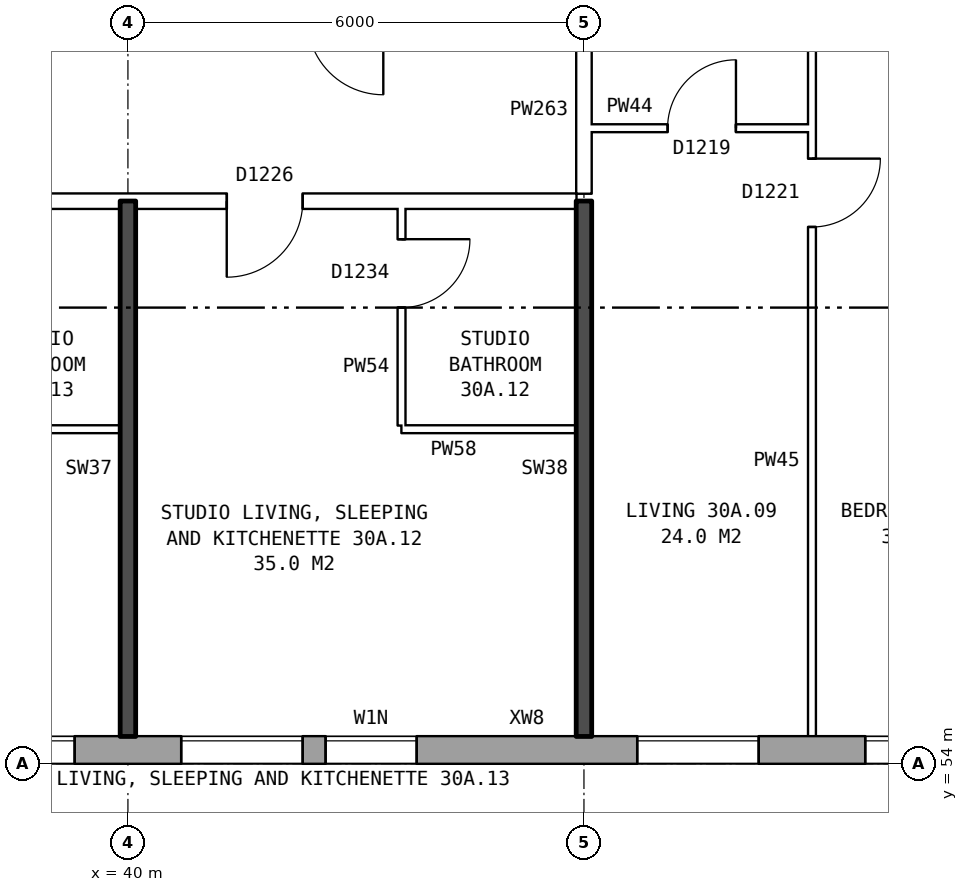
"""IFC4 building model, lengths in metres.
Left out: names, types, materials, properties, quantities, classifications, styles, units other than length and angle.
Written with IfcOpenShell. Run it as: python <this file> out.ifc"""

import sys

from ifc_helpers import new_model, si_unit, direction, frame, frame_2d, origin, place, context, subcontext, project, spatial, rectangle, extrude, element, fill, save


model = new_model("IFC4")
c1 = context("Model", 3, precision=1e-05, world=origin(), true_north=direction((0.0, 1.0)))
c2 = subcontext(c1, "Body", "Model", "MODEL_VIEW")
j1 = project(units=[si_unit("LENGTHUNIT", "METRE"), si_unit("PLANEANGLEUNIT", "RADIAN")], contexts=[c1])
p1 = place(None, origin())
s1 = spatial("IfcSite", under=j1, at=p1, CompositionType="ELEMENT")
p2 = place(p1, origin())
s2 = spatial("IfcBuilding", under=s1, at=p2, CompositionType="ELEMENT")
p3 = place(p2, frame((0.0, 0.0, 108.8)))
s3 = spatial("IfcBuildingStorey", under=s2, at=p3, CompositionType="ELEMENT", Elevation=108.8)
p4 = place(p3, frame((28.075, 54.18, 0.0), z_axis=(0.0, 0.0, 1.0), x_axis=(1.0, 0.0, 0.0)))
e1 = element("IfcWall", 1, at=p4, inside=s3, PredefinedType="STANDARD", context=c2, shape_type="SweptSolid", body=[
    extrude(rectangle(XDim=44.851, YDim=0.36, at=frame_2d((22.425, 0.0))), origin(), (0.0, 0.0, 1.0), 2.85),
])
p5 = place(p4, frame((0.625, 0.0, 0.8)))
e2 = element("IfcOpeningElement", 2, at=p5, cuts=e1, PredefinedType="OPENING", context=c2, shape_type="SweptSolid", body=[
    extrude(rectangle(XDim=1.6, YDim=1.8, at=frame_2d((0.8, 0.9))), frame((0.0, 0.19, 0.0), z_axis=(0.0, -1.0, 0.0), x_axis=(1.0, 0.0, 0.0)), (0.0, 0.0, 1.0), 0.38),
])
p6 = place(p4, frame((3.625, 0.0, 0.8)))
e3 = element("IfcOpeningElement", 3, at=p6, cuts=e1, PredefinedType="OPENING", context=c2, shape_type="SweptSolid", body=[
    extrude(rectangle(XDim=1.6, YDim=1.8, at=frame_2d((0.8, 0.9))), frame((0.0, 0.19, 0.0), z_axis=(0.0, -1.0, 0.0), x_axis=(1.0, 0.0, 0.0)), (0.0, 0.0, 1.0), 0.38),
])
p7 = place(p4, frame((6.625, 0.0, 0.8)))
e4 = element("IfcOpeningElement", 4, at=p7, cuts=e1, PredefinedType="OPENING", context=c2, shape_type="SweptSolid", body=[
    extrude(rectangle(XDim=1.6, YDim=1.8, at=frame_2d((0.8, 0.9))), frame((0.0, 0.19, 0.0), z_axis=(0.0, -1.0, 0.0), x_axis=(1.0, 0.0, 0.0)), (0.0, 0.0, 1.0), 0.38),
])
p8 = place(p4, frame((9.625, 0.0, 0.8)))
e5 = element("IfcOpeningElement", 5, at=p8, cuts=e1, PredefinedType="OPENING", context=c2, shape_type="SweptSolid", body=[
    extrude(rectangle(XDim=1.6, YDim=1.8, at=frame_2d((0.8, 0.9))), frame((0.0, 0.19, 0.0), z_axis=(0.0, -1.0, 0.0), x_axis=(1.0, 0.0, 0.0)), (0.0, 0.0, 1.0), 0.38),
])
p9 = place(p4, frame((12.625, 0.0, 0.8)))
e6 = element("IfcOpeningElement", 6, at=p9, cuts=e1, PredefinedType="OPENING", context=c2, shape_type="SweptSolid", body=[
    extrude(rectangle(XDim=1.6, YDim=1.8, at=frame_2d((0.8, 0.9))), frame((0.0, 0.19, 0.0), z_axis=(0.0, -1.0, 0.0), x_axis=(1.0, 0.0, 0.0)), (0.0, 0.0, 1.0), 0.38),
])
p10 = place(p4, frame((14.525, 0.0, 1.4)))
e7 = element("IfcOpeningElement", 7, at=p10, cuts=e1, PredefinedType="OPENING", context=c2, shape_type="SweptSolid", body=[
    extrude(rectangle(XDim=1.2, YDim=1.2, at=frame_2d((0.6, 0.6))), frame((0.0, 0.19, 0.0), z_axis=(0.0, -1.0, 0.0), x_axis=(1.0, 0.0, 0.0)), (0.0, 0.0, 1.0), 0.38),
])
p11 = place(p4, frame((18.625, 0.0, 0.8)))
e8 = element("IfcOpeningElement", 8, at=p11, cuts=e1, PredefinedType="OPENING", context=c2, shape_type="SweptSolid", body=[
    extrude(rectangle(XDim=1.6, YDim=1.8, at=frame_2d((0.8, 0.9))), frame((0.0, 0.19, 0.0), z_axis=(0.0, -1.0, 0.0), x_axis=(1.0, 0.0, 0.0)), (0.0, 0.0, 1.0), 0.38),
])
p12 = place(p4, frame((21.625, 0.0, 0.8)))
e9 = element("IfcOpeningElement", 9, at=p12, cuts=e1, PredefinedType="OPENING", context=c2, shape_type="SweptSolid", body=[
    extrude(rectangle(XDim=1.6, YDim=1.8, at=frame_2d((0.8, 0.9))), frame((0.0, 0.19, 0.0), z_axis=(0.0, -1.0, 0.0), x_axis=(1.0, 0.0, 0.0)), (0.0, 0.0, 1.0), 0.38),
])
p13 = place(p4, frame((24.625, 0.0, 0.8)))
e10 = element("IfcOpeningElement", 10, at=p13, cuts=e1, PredefinedType="OPENING", context=c2, shape_type="SweptSolid", body=[
    extrude(rectangle(XDim=1.6, YDim=1.8, at=frame_2d((0.8, 0.9))), frame((0.0, 0.19, 0.0), z_axis=(0.0, -1.0, 0.0), x_axis=(1.0, 0.0, 0.0)), (0.0, 0.0, 1.0), 0.38),
])
p14 = place(p4, frame((27.075, 0.0, 0.15)))
e11 = element("IfcOpeningElement", 11, at=p14, cuts=e1, PredefinedType="OPENING", context=c2, shape_type="SweptSolid", body=[
    extrude(rectangle(XDim=1.2, YDim=0.9, at=frame_2d((0.6, 0.45))), frame((0.0, 0.19, 0.0), z_axis=(0.0, -1.0, 0.0), x_axis=(1.0, 0.0, 0.0)), (0.0, 0.0, 1.0), 0.38),
])
p15 = place(p4, frame((30.625, 0.0, 0.8)))
e12 = element("IfcOpeningElement", 12, at=p15, cuts=e1, PredefinedType="OPENING", context=c2, shape_type="SweptSolid", body=[
    extrude(rectangle(XDim=1.6, YDim=1.8, at=frame_2d((0.8, 0.9))), frame((0.0, 0.19, 0.0), z_axis=(0.0, -1.0, 0.0), x_axis=(1.0, 0.0, 0.0)), (0.0, 0.0, 1.0), 0.38),
])
p16 = place(p4, frame((33.625, 0.0, 0.8)))
e13 = element("IfcOpeningElement", 13, at=p16, cuts=e1, PredefinedType="OPENING", context=c2, shape_type="SweptSolid", body=[
    extrude(rectangle(XDim=1.6, YDim=1.8, at=frame_2d((0.8, 0.9))), frame((0.0, 0.19, 0.0), z_axis=(0.0, -1.0, 0.0), x_axis=(1.0, 0.0, 0.0)), (0.0, 0.0, 1.0), 0.38),
])
p17 = place(p4, frame((36.625, 0.0, 0.8)))
e14 = element("IfcOpeningElement", 14, at=p17, cuts=e1, PredefinedType="OPENING", context=c2, shape_type="SweptSolid", body=[
    extrude(rectangle(XDim=1.6, YDim=1.8, at=frame_2d((0.8, 0.9))), frame((0.0, 0.19, 0.0), z_axis=(0.0, -1.0, 0.0), x_axis=(1.0, 0.0, 0.0)), (0.0, 0.0, 1.0), 0.38),
])
p18 = place(p4, frame((39.625, 0.0, 0.8)))
e15 = element("IfcOpeningElement", 15, at=p18, cuts=e1, PredefinedType="OPENING", context=c2, shape_type="SweptSolid", body=[
    extrude(rectangle(XDim=1.6, YDim=1.8, at=frame_2d((0.8, 0.9))), frame((0.0, 0.19, 0.0), z_axis=(0.0, -1.0, 0.0), x_axis=(1.0, 0.0, 0.0)), (0.0, 0.0, 1.0), 0.38),
])
p19 = place(p4, frame((42.625, 0.0, 0.8)))
e16 = element("IfcOpeningElement", 16, at=p19, cuts=e1, PredefinedType="OPENING", context=c2, shape_type="SweptSolid", body=[
    extrude(rectangle(XDim=1.6, YDim=1.8, at=frame_2d((0.8, 0.9))), frame((0.0, 0.19, 0.0), z_axis=(0.0, -1.0, 0.0), x_axis=(1.0, 0.0, 0.0)), (0.0, 0.0, 1.0), 0.38),
])
p20 = place(p4, frame((28.725, 0.0, 1.65)))
e17 = element("IfcOpeningElement", 17, at=p20, cuts=e1, PredefinedType="OPENING", context=c2, shape_type="SweptSolid", body=[
    extrude(rectangle(XDim=1.0, YDim=0.9, at=frame_2d((0.5, 0.45))), frame((0.0, 0.19, 0.0), z_axis=(0.0, -1.0, 0.0), x_axis=(1.0, 0.0, 0.0)), (0.0, 0.0, 1.0), 0.38),
])
for number, where, z_axis, x_axis in (
    (18, (37.6, 58.4, 0.0), (0.0, 0.0, 1.0), (1.0, 0.0, 0.0)),
    (19, (43.6, 58.4, 0.0), (0.0, 0.0, 1.0), (1.0, 0.0, 0.0)),
):
    element("IfcWall", number, at=place(p3, frame(where, z_axis=z_axis, x_axis=x_axis)), inside=s3, PredefinedType="PARTITIONING", context=c2, shape_type="SweptSolid", body=[
        extrude(rectangle(XDim=2.3, YDim=0.1, at=frame_2d((1.15, 0.0))), origin(), (0.0, 0.0, 1.0), 2.85),
    ])
p21 = place(p3, frame((25.36, 61.4, 0.0), z_axis=(0.0, 0.0, 1.0), x_axis=(1.0, 0.0, 0.0)))
e20 = element("IfcWall", 20, at=p21, inside=s3, PredefinedType="PARTITIONING", context=c2, shape_type="SweptSolid", body=[
    extrude(rectangle(XDim=20.54, YDim=0.2, at=frame_2d((10.27, 0.0))), origin(), (0.0, 0.0, 1.0), 2.85),
])
p22 = place(p21, frame((15.94, 0.0, 0.0)))
e21 = element("IfcOpeningElement", 21, at=p22, cuts=e20, PredefinedType="OPENING", context=c2, shape_type="SweptSolid", body=[
    extrude(rectangle(XDim=1.0, YDim=2.1, at=frame_2d((0.5, 1.05))), frame((0.0, 0.11, 0.0), z_axis=(0.0, -1.0, 0.0), x_axis=(1.0, 0.0, 0.0)), (0.0, 0.0, 1.0), 0.22),
])
p23 = place(p21, frame((9.94, 0.0, 0.0)))
e22 = element("IfcOpeningElement", 22, at=p23, cuts=e20, PredefinedType="OPENING", context=c2, shape_type="SweptSolid", body=[
    extrude(rectangle(XDim=1.0, YDim=2.1, at=frame_2d((0.5, 1.05))), frame((0.0, 0.11, 0.0), z_axis=(0.0, -1.0, 0.0), x_axis=(1.0, 0.0, 0.0)), (0.0, 0.0, 1.0), 0.22),
])
p24 = place(p21, frame((2.62, 0.0, 0.0)))
e23 = element("IfcOpeningElement", 23, at=p24, cuts=e20, PredefinedType="OPENING", context=c2, shape_type="SweptSolid", body=[
    extrude(rectangle(XDim=1.0, YDim=2.1, at=frame_2d((0.5, 1.05))), frame((0.0, 0.11, 0.0), z_axis=(0.0, -1.0, 0.0), x_axis=(1.0, 0.0, 0.0)), (0.0, 0.0, 1.0), 0.22),
])
p25 = place(p3, frame((46.1, 62.36, 0.0), z_axis=(0.0, 0.0, 1.0), x_axis=(1.0, 0.0, 0.0)))
e24 = element("IfcWall", 24, at=p25, inside=s3, PredefinedType="PARTITIONING", context=c2, shape_type="SweptSolid", body=[
    extrude(rectangle(XDim=2.9, YDim=0.1, at=frame_2d((1.45, 0.0))), origin(), (0.0, 0.0, 1.0), 2.85),
])
p26 = place(p25, frame((1.0, 0.0, 0.0)))
e25 = element("IfcOpeningElement", 25, at=p26, cuts=e24, PredefinedType="OPENING", context=c2, shape_type="SweptSolid", body=[
    extrude(rectangle(XDim=0.9, YDim=2.1, at=frame_2d((0.45, 1.05))), frame((0.0, 0.06, 0.0), z_axis=(0.0, -1.0, 0.0), x_axis=(1.0, 0.0, 0.0)), (0.0, 0.0, 1.0), 0.12),
])
p27 = place(p3, frame((40.0, 54.36, 0.0), z_axis=(0.0, 0.0, 1.0), x_axis=(0.0, 1.0, 0.0)))
e26 = element("IfcWall", 26, at=p27, inside=s3, PredefinedType="SOLIDWALL", context=c2, shape_type="SweptSolid", body=[
    extrude(rectangle(XDim=7.04, YDim=0.2, at=frame_2d((3.52, 0.0))), origin(), (0.0, 0.0, 1.0), 2.85),
])
p28 = place(p3, frame((43.6, 58.45, 0.0), z_axis=(0.0, 0.0, 1.0), x_axis=(0.0, 1.0, 0.0)))
e27 = element("IfcWall", 27, at=p28, inside=s3, PredefinedType="PARTITIONING", context=c2, shape_type="SweptSolid", body=[
    extrude(rectangle(XDim=2.85, YDim=0.1, at=frame_2d((1.425, 0.0))), origin(), (0.0, 0.0, 1.0), 2.85),
])
p29 = place(p28, frame((1.55, 0.0, 0.0)))
e28 = element("IfcOpeningElement", 28, at=p29, cuts=e27, PredefinedType="OPENING", context=c2, shape_type="SweptSolid", body=[
    extrude(rectangle(XDim=0.9, YDim=2.1, at=frame_2d((0.45, 1.05))), frame((0.0, 0.06, 0.0), z_axis=(0.0, -1.0, 0.0), x_axis=(1.0, 0.0, 0.0)), (0.0, 0.0, 1.0), 0.12),
])
p30 = place(p3, frame((46.0, 54.36, 0.0), z_axis=(0.0, 0.0, 1.0), x_axis=(0.0, 1.0, 0.0)))
e29 = element("IfcWall", 29, at=p30, inside=s3, PredefinedType="SOLIDWALL", context=c2, shape_type="SweptSolid", body=[
    extrude(rectangle(XDim=7.04, YDim=0.2, at=frame_2d((3.52, 0.0))), origin(), (0.0, 0.0, 1.0), 2.85),
])
p31 = place(p3, frame((46.0, 61.5, 0.0), z_axis=(0.0, 0.0, 1.0), x_axis=(0.0, 1.0, 0.0)))
e30 = element("IfcWall", 30, at=p31, inside=s3, PredefinedType="PARTITIONING", context=c2, shape_type="SweptSolid", body=[
    extrude(rectangle(XDim=2.2, YDim=0.2, at=frame_2d((1.1, 0.0))), origin(), (0.0, 0.0, 1.0), 2.85),
])
p32 = place(p3, frame((49.0, 54.36, 0.0), z_axis=(0.0, 0.0, 1.0), x_axis=(0.0, 1.0, 0.0)))
e31 = element("IfcWall", 31, at=p32, inside=s3, PredefinedType="PARTITIONING", context=c2, shape_type="SweptSolid", body=[
    extrude(rectangle(XDim=14.34, YDim=0.1, at=frame_2d((7.17, 0.0))), origin(), (0.0, 0.0, 1.0), 2.85),
])
p33 = place(p32, frame((6.7, 0.0, 0.0)))
e32 = element("IfcOpeningElement", 32, at=p33, cuts=e31, PredefinedType="OPENING", context=c2, shape_type="SweptSolid", body=[
    extrude(rectangle(XDim=0.9, YDim=2.1, at=frame_2d((0.45, 1.05))), frame((0.0, 0.06, 0.0), z_axis=(0.0, -1.0, 0.0), x_axis=(1.0, 0.0, 0.0)), (0.0, 0.0, 1.0), 0.12),
])
p34 = place(p32, frame((13.04, 0.0, 0.0)))
e33 = element("IfcOpeningElement", 33, at=p34, cuts=e31, PredefinedType="OPENING", context=c2, shape_type="SweptSolid", body=[
    extrude(rectangle(XDim=0.9, YDim=2.1, at=frame_2d((0.45, 1.05))), frame((0.0, 0.06, 0.0), z_axis=(0.0, -1.0, 0.0), x_axis=(1.0, 0.0, 0.0)), (0.0, 0.0, 1.0), 0.12),
])
p35 = place(p8, origin())
e34 = element("IfcWindow", 34, at=p35, inside=s3, PartitioningType="SINGLE_PANEL", PredefinedType="WINDOW", context=c2, shape_type="SweptSolid", body=[
    extrude(rectangle(XDim=1.6, YDim=1.8, at=frame_2d((0.8, 0.9))), frame((0.0, 0.15, 0.0), z_axis=(0.0, -1.0, 0.0), x_axis=(1.0, 0.0, 0.0)), (0.0, 0.0, 1.0), 0.06),
])
fill(e5, e34)
p36 = place(p9, origin())
e35 = element("IfcWindow", 35, at=p36, inside=s3, PartitioningType="SINGLE_PANEL", PredefinedType="WINDOW", context=c2, shape_type="SweptSolid", body=[
    extrude(rectangle(XDim=1.6, YDim=1.8, at=frame_2d((0.8, 0.9))), frame((0.0, 0.15, 0.0), z_axis=(0.0, -1.0, 0.0), x_axis=(1.0, 0.0, 0.0)), (0.0, 0.0, 1.0), 0.06),
])
fill(e6, e35)
p37 = place(p10, origin())
e36 = element("IfcWindow", 36, at=p37, inside=s3, PartitioningType="SINGLE_PANEL", PredefinedType="WINDOW", context=c2, shape_type="SweptSolid", body=[
    extrude(rectangle(XDim=1.2, YDim=1.2, at=frame_2d((0.6, 0.6))), frame((0.0, 0.15, 0.0), z_axis=(0.0, -1.0, 0.0), x_axis=(1.0, 0.0, 0.0)), (0.0, 0.0, 1.0), 0.06),
])
fill(e7, e36)
p38 = place(p11, origin())
e37 = element("IfcWindow", 37, at=p38, inside=s3, PartitioningType="SINGLE_PANEL", PredefinedType="WINDOW", context=c2, shape_type="SweptSolid", body=[
    extrude(rectangle(XDim=1.6, YDim=1.8, at=frame_2d((0.8, 0.9))), frame((0.0, 0.15, 0.0), z_axis=(0.0, -1.0, 0.0), x_axis=(1.0, 0.0, 0.0)), (0.0, 0.0, 1.0), 0.06),
])
fill(e8, e37)
p39 = place(p12, origin())
e38 = element("IfcWindow", 38, at=p39, inside=s3, PartitioningType="SINGLE_PANEL", PredefinedType="WINDOW", context=c2, shape_type="SweptSolid", body=[
    extrude(rectangle(XDim=1.6, YDim=1.8, at=frame_2d((0.8, 0.9))), frame((0.0, 0.15, 0.0), z_axis=(0.0, -1.0, 0.0), x_axis=(1.0, 0.0, 0.0)), (0.0, 0.0, 1.0), 0.06),
])
fill(e9, e38)
p40 = place(p33, frame((0.9, 0.0, 0.0), z_axis=(0.0, 0.0, 1.0), x_axis=(-1.0, 0.0, 0.0)))
e39 = element("IfcDoor", 39, at=p40, inside=s3, OperationType="SINGLE_SWING_LEFT", PredefinedType="DOOR", context=c2, shape_type="SweptSolid", body=[
    extrude(rectangle(XDim=0.9, YDim=2.1, at=frame_2d((0.45, 1.05))), frame((0.0, 0.025, 0.0), z_axis=(0.0, -1.0, 0.0), x_axis=(1.0, 0.0, 0.0)), (0.0, 0.0, 1.0), 0.05),
])
fill(e32, e39)
p41 = place(p26, origin())
e40 = element("IfcDoor", 40, at=p41, inside=s3, OperationType="SINGLE_SWING_RIGHT", PredefinedType="DOOR", context=c2, shape_type="SweptSolid", body=[
    extrude(rectangle(XDim=0.9, YDim=2.1, at=frame_2d((0.45, 1.05))), frame((0.0, 0.025, 0.0), z_axis=(0.0, -1.0, 0.0), x_axis=(1.0, 0.0, 0.0)), (0.0, 0.0, 1.0), 0.05),
])
fill(e25, e40)
p42 = place(p22, frame((1.0, 0.0, 0.0), z_axis=(0.0, 0.0, 1.0), x_axis=(-1.0, 0.0, 0.0)))
e41 = element("IfcDoor", 41, at=p42, inside=s3, OperationType="SINGLE_SWING_RIGHT", PredefinedType="DOOR", context=c2, shape_type="SweptSolid", body=[
    extrude(rectangle(XDim=1.0, YDim=2.1, at=frame_2d((0.5, 1.05))), frame((0.0, 0.025, 0.0), z_axis=(0.0, -1.0, 0.0), x_axis=(1.0, 0.0, 0.0)), (0.0, 0.0, 1.0), 0.05),
])
fill(e21, e41)
p43 = place(p29, frame((0.9, 0.0, 0.0), z_axis=(0.0, 0.0, 1.0), x_axis=(-1.0, 0.0, 0.0)))
e42 = element("IfcDoor", 42, at=p43, inside=s3, OperationType="SINGLE_SWING_LEFT", PredefinedType="DOOR", context=c2, shape_type="SweptSolid", body=[
    extrude(rectangle(XDim=0.9, YDim=2.1, at=frame_2d((0.45, 1.05))), frame((0.0, 0.025, 0.0), z_axis=(0.0, -1.0, 0.0), x_axis=(1.0, 0.0, 0.0)), (0.0, 0.0, 1.0), 0.05),
])
fill(e28, e42)
save(model, sys.argv[1])
